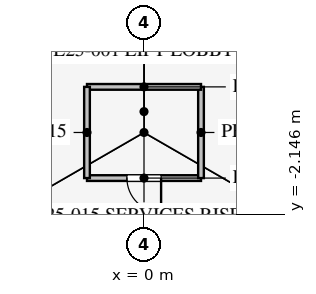
"""IFC4 building model, lengths in metres.
Left out: names, types, materials, properties, quantities, classifications, styles, units other than length and angle.
Written with IfcOpenShell. Run it as: python <this file> out.ifc"""

import sys

from ifc_helpers import new_model, si_unit, direction, frame, frame_2d, origin, place, context, subcontext, project, spatial, rectangle, extrude, element, fill, save


model = new_model("IFC4")
c1 = context("Model", 3, precision=1e-05, world=origin(), true_north=direction((0.0, 1.0)))
c2 = subcontext(c1, "Body", "Model", "MODEL_VIEW")
j1 = project(units=[si_unit("LENGTHUNIT", "METRE"), si_unit("PLANEANGLEUNIT", "RADIAN")], contexts=[c1])
p1 = place(None, origin())
s1 = spatial("IfcSite", under=j1, at=p1, CompositionType="ELEMENT")
p2 = place(p1, origin())
s2 = spatial("IfcBuilding", under=s1, at=p2, CompositionType="ELEMENT")
p3 = place(p2, frame((0.0, 0.0, 111.5)))
s3 = spatial("IfcBuildingStorey", under=s2, at=p3, CompositionType="ELEMENT", Elevation=111.5)
p4 = place(p3, frame((-1.5, -1.2, 0.0), z_axis=(0.0, 0.0, 1.0), x_axis=(1.0, 0.0, 0.0)))
e1 = element("IfcWall", 1, at=p4, inside=s3, PredefinedType="PARTITIONING", context=c2, shape_type="SweptSolid", body=[
    extrude(rectangle(XDim=3.0, YDim=0.15, at=frame_2d((1.5, 0.0))), origin(), (0.0, 0.0, 1.0), 4.0),
])
p5 = place(p4, frame((1.05, 0.0, 0.0)))
e2 = element("IfcOpeningElement", 2, at=p5, cuts=e1, PredefinedType="OPENING", context=c2, shape_type="SweptSolid", body=[
    extrude(rectangle(XDim=0.9, YDim=2.1, at=frame_2d((0.45, 1.05))), frame((0.0, 0.085, 0.0), z_axis=(0.0, -1.0, 0.0), x_axis=(1.0, 0.0, 0.0)), (0.0, 0.0, 1.0), 0.17),
])
p6 = place(p3, frame((1.5, -1.2, 0.0), z_axis=(0.0, 0.0, 1.0), x_axis=(0.0, 1.0, 0.0)))
e3 = element("IfcWall", 3, at=p6, inside=s3, PredefinedType="PARTITIONING", context=c2, shape_type="SweptSolid", body=[
    extrude(rectangle(XDim=2.4, YDim=0.15, at=frame_2d((1.2, 0.0))), origin(), (0.0, 0.0, 1.0), 4.0),
])
p7 = place(p3, frame((1.5, 1.2, 0.0), z_axis=(0.0, 0.0, 1.0), x_axis=(-1.0, 0.0, 0.0)))
e4 = element("IfcWall", 4, at=p7, inside=s3, PredefinedType="PARTITIONING", context=c2, shape_type="SweptSolid", body=[
    extrude(rectangle(XDim=3.0, YDim=0.15, at=frame_2d((1.5, 0.0))), origin(), (0.0, 0.0, 1.0), 4.0),
])
p8 = place(p3, frame((-1.5, 1.2, 0.0), z_axis=(0.0, 0.0, 1.0), x_axis=(0.0, -1.0, 0.0)))
e5 = element("IfcWall", 5, at=p8, inside=s3, PredefinedType="PARTITIONING", context=c2, shape_type="SweptSolid", body=[
    extrude(rectangle(XDim=2.4, YDim=0.15, at=frame_2d((1.2, 0.0))), origin(), (0.0, 0.0, 1.0), 4.0),
])
p9 = place(p3, frame((-0.016, 30.491, 0.0), z_axis=(0.0, 0.0, 1.0), x_axis=(-0.50000091641, -0.866024874695, 0.0)))
e6 = element("IfcWall", 6, at=p9, inside=s3, PredefinedType="PARTITIONING", context=c2, shape_type="SweptSolid", body=[
    extrude(rectangle(XDim=52.796, YDim=0.12, at=frame_2d((26.398, 0.0))), origin(), (0.0, 0.0, 1.0), 2.9),
])
p10 = place(p9, frame((10.2, 0.0, 0.15)))
e7 = element("IfcOpeningElement", 7, at=p10, cuts=e6, PredefinedType="OPENING", context=c2, shape_type="SweptSolid", body=[
    extrude(rectangle(XDim=1.8, YDim=2.1, at=frame_2d((0.9, 1.05))), frame((0.0, 0.07, 0.0), z_axis=(0.0, -1.0, 0.0), x_axis=(1.0, 0.0, 0.0)), (0.0, 0.0, 1.0), 0.14),
])
p11 = place(p9, frame((40.8, 0.0, 0.15)))
e8 = element("IfcOpeningElement", 8, at=p11, cuts=e6, PredefinedType="OPENING", context=c2, shape_type="SweptSolid", body=[
    extrude(rectangle(XDim=1.8, YDim=2.1, at=frame_2d((0.9, 1.05))), frame((0.0, 0.07, 0.0), z_axis=(0.0, -1.0, 0.0), x_axis=(1.0, 0.0, 0.0)), (0.0, 0.0, 1.0), 0.14),
])
p12 = place(p5, frame((0.9, 0.0, 0.0), z_axis=(0.0, 0.0, 1.0), x_axis=(-1.0, 0.0, 0.0)))
e9 = element("IfcDoor", 9, at=p12, inside=s3, OperationType="SINGLE_SWING_LEFT", PredefinedType="DOOR", context=c2, shape_type="SweptSolid", body=[
    extrude(rectangle(XDim=0.9, YDim=2.1, at=frame_2d((0.45, 1.05))), frame((0.0, 0.025, 0.0), z_axis=(0.0, -1.0, 0.0), x_axis=(1.0, 0.0, 0.0)), (0.0, 0.0, 1.0), 0.05),
])
fill(e2, e9)
save(model, sys.argv[1])
